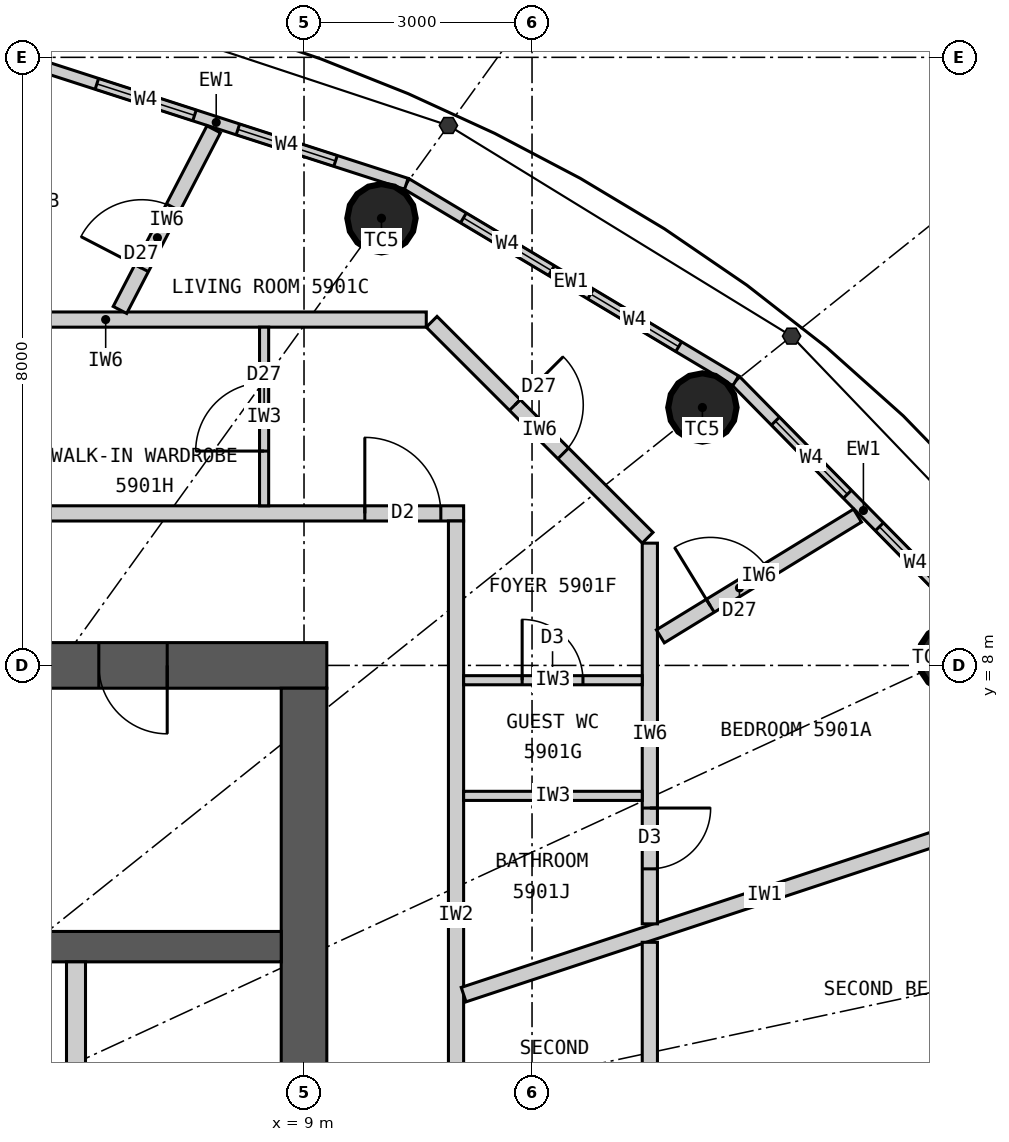
"""IFC4 building model, lengths in metres.
Left out: names, types, materials, properties, quantities, classifications, styles, units other than length and angle.
Written with IfcOpenShell. Run it as: python <this file> out.ifc"""

import sys

from ifc_helpers import new_model, si_unit, direction, frame, frame_2d, origin, origin_2d, place, context, subcontext, project, spatial, rectangle, circle, extrude, element, fill, save


model = new_model("IFC4")
c1 = context("Model", 3, precision=1e-05, world=origin(), true_north=direction((0.0, 1.0)))
c2 = subcontext(c1, "Body", "Model", "MODEL_VIEW")
j1 = project(units=[si_unit("LENGTHUNIT", "METRE"), si_unit("PLANEANGLEUNIT", "RADIAN")], contexts=[c1])
p1 = place(None, origin())
s1 = spatial("IfcSite", under=j1, at=p1, CompositionType="ELEMENT")
p2 = place(p1, origin())
s2 = spatial("IfcBuilding", under=s1, at=p2, CompositionType="ELEMENT")
p3 = place(p2, frame((0.0, 0.0, 219.3)))
s3 = spatial("IfcBuildingStorey", under=s2, at=p3, CompositionType="ELEMENT", Elevation=219.3)
for number, where, z_axis, x_axis in (
    (1, (17.532, 8.098, 0.0), (0.0, 0.0, 1.0), (1.0, 0.0, 0.0)),
    (2, (14.241, 11.393, 0.0), (0.0, 0.0, 1.0), (1.0, 0.0, 0.0)),
    (3, (10.019, 13.883, 0.0), (0.0, 0.0, 1.0), (1.0, 0.0, 0.0)),
):
    element("IfcColumn", number, at=place(p3, frame(where, z_axis=z_axis, x_axis=x_axis)), inside=s3, PredefinedType="COLUMN", context=c2, shape_type="SweptSolid", body=[
        extrude(circle(Radius=0.45, at=origin_2d()), origin(), (0.0, 0.0, 1.0), 3.3),
    ])
p4 = place(p3, frame((-9.3, 8.0, 0.0), z_axis=(0.0, 0.0, 1.0), x_axis=(1.0, 0.0, 0.0)))
e4 = element("IfcWall", 4, at=p4, inside=s3, PredefinedType="SHEAR", context=c2, shape_type="SweptSolid", body=[
    extrude(rectangle(XDim=18.6, YDim=0.6, at=frame_2d((9.3, 0.0))), origin(), (0.0, 0.0, 1.0), 3.3),
])
p5 = place(p4, frame((8.0, 0.0, 0.0)))
e5 = element("IfcOpeningElement", 5, at=p5, cuts=e4, PredefinedType="OPENING", context=c2, shape_type="SweptSolid", body=[
    extrude(rectangle(XDim=1.2, YDim=2.2, at=frame_2d((0.6, 1.1))), frame((0.0, 0.31, 0.0), z_axis=(0.0, -1.0, 0.0), x_axis=(1.0, 0.0, 0.0)), (0.0, 0.0, 1.0), 0.62),
])
p6 = place(p4, frame((15.6, 0.0, 0.0)))
e6 = element("IfcOpeningElement", 6, at=p6, cuts=e4, PredefinedType="OPENING", context=c2, shape_type="SweptSolid", body=[
    extrude(rectangle(XDim=0.9, YDim=2.2, at=frame_2d((0.45, 1.1))), frame((0.0, 0.31, 0.0), z_axis=(0.0, -1.0, 0.0), x_axis=(1.0, 0.0, 0.0)), (0.0, 0.0, 1.0), 0.62),
])
p7 = place(p3, frame((9.0, -7.7, 0.0), z_axis=(0.0, 0.0, 1.0), x_axis=(0.0, 1.0, 0.0)))
e7 = element("IfcWall", 7, at=p7, inside=s3, PredefinedType="SHEAR", context=c2, shape_type="SweptSolid", body=[
    extrude(rectangle(XDim=15.4, YDim=0.6, at=frame_2d((7.7, 0.0))), origin(), (0.0, 0.0, 1.0), 3.3),
])
p8 = place(p7, frame((6.8, 0.0, 0.0)))
e8 = element("IfcOpeningElement", 8, at=p8, cuts=e7, PredefinedType="OPENING", context=c2, shape_type="SweptSolid", body=[
    extrude(rectangle(XDim=1.8, YDim=2.2, at=frame_2d((0.9, 1.1))), frame((0.0, 0.31, 0.0), z_axis=(0.0, -1.0, 0.0), x_axis=(1.0, 0.0, 0.0)), (0.0, 0.0, 1.0), 0.62),
])
p9 = place(p3, frame((-8.7, 4.3, 0.0), z_axis=(0.0, 0.0, 1.0), x_axis=(1.0, 0.0, 0.0)))
e9 = element("IfcWall", 9, at=p9, inside=s3, PredefinedType="SHEAR", context=c2, shape_type="SweptSolid", body=[
    extrude(rectangle(XDim=17.4, YDim=0.4, at=frame_2d((8.7, 0.0))), origin(), (0.0, 0.0, 1.0), 3.3),
])
p10 = place(p3, frame((6.0, 1.75, 0.0), z_axis=(0.0, 0.0, 1.0), x_axis=(0.0, 1.0, 0.0)))
e10 = element("IfcWall", 10, at=p10, inside=s3, PredefinedType="PARTITIONING", context=c2, shape_type="SweptSolid", body=[
    extrude(rectangle(XDim=2.35, YDim=0.25, at=frame_2d((1.175, 0.0))), origin(), (0.0, 0.0, 1.0), 3.3),
])
p11 = place(p3, frame((18.04, 8.332, 0.0), z_axis=(0.0, 0.0, 1.0), x_axis=(-0.701527379618, 0.712642501993, 0.0)))
e11 = element("IfcWall", 11, at=p11, inside=s3, PredefinedType="ELEMENTEDWALL", context=c2, shape_type="SweptSolid", body=[
    extrude(rectangle(XDim=4.788, YDim=0.15, at=frame_2d((2.394, 0.0))), origin(), (0.0, 0.0, 1.0), 3.12),
])
p12 = place(p11, frame((0.744, 0.0, 0.9)))
e12 = element("IfcOpeningElement", 12, at=p12, cuts=e11, PredefinedType="OPENING", context=c2, shape_type="SweptSolid", body=[
    extrude(rectangle(XDim=1.35, YDim=1.9, at=frame_2d((0.675, 0.95))), frame((0.0, 0.085, 0.0), z_axis=(0.0, -1.0, 0.0), x_axis=(1.0, 0.0, 0.0)), (0.0, 0.0, 1.0), 0.17),
])
p13 = place(p11, frame((2.694, 0.0, 0.9)))
e13 = element("IfcOpeningElement", 13, at=p13, cuts=e11, PredefinedType="OPENING", context=c2, shape_type="SweptSolid", body=[
    extrude(rectangle(XDim=1.35, YDim=1.9, at=frame_2d((0.675, 0.95))), frame((0.0, 0.085, 0.0), z_axis=(0.0, -1.0, 0.0), x_axis=(1.0, 0.0, 0.0)), (0.0, 0.0, 1.0), 0.17),
])
p14 = place(p3, frame((14.68, 11.744, 0.0), z_axis=(0.0, 0.0, 1.0), x_axis=(-0.85822150553, 0.513279502265, 0.0)))
e14 = element("IfcWall", 14, at=p14, inside=s3, PredefinedType="ELEMENTEDWALL", context=c2, shape_type="SweptSolid", body=[
    extrude(rectangle(XDim=5.05, YDim=0.15, at=frame_2d((2.525, 0.0))), origin(), (0.0, 0.0, 1.0), 3.12),
])
p15 = place(p14, frame((0.875, 0.0, 0.9)))
e15 = element("IfcOpeningElement", 15, at=p15, cuts=e14, PredefinedType="OPENING", context=c2, shape_type="SweptSolid", body=[
    extrude(rectangle(XDim=1.35, YDim=1.9, at=frame_2d((0.675, 0.95))), frame((0.0, 0.085, 0.0), z_axis=(0.0, -1.0, 0.0), x_axis=(1.0, 0.0, 0.0)), (0.0, 0.0, 1.0), 0.17),
])
p16 = place(p14, frame((2.825, 0.0, 0.9)))
e16 = element("IfcOpeningElement", 16, at=p16, cuts=e14, PredefinedType="OPENING", context=c2, shape_type="SweptSolid", body=[
    extrude(rectangle(XDim=1.35, YDim=1.9, at=frame_2d((0.675, 0.95))), frame((0.0, 0.085, 0.0), z_axis=(0.0, -1.0, 0.0), x_axis=(1.0, 0.0, 0.0)), (0.0, 0.0, 1.0), 0.17),
])
p17 = place(p3, frame((10.346, 14.336, 0.0), z_axis=(0.0, 0.0, 1.0), x_axis=(-0.951644702515, 0.307200846638, 0.0)))
e17 = element("IfcWall", 17, at=p17, inside=s3, PredefinedType="ELEMENTEDWALL", context=c2, shape_type="SweptSolid", body=[
    extrude(rectangle(XDim=5.258, YDim=0.15, at=frame_2d((2.629, 0.0))), origin(), (0.0, 0.0, 1.0), 3.12),
])
p18 = place(p17, frame((0.979, 0.0, 0.9)))
e18 = element("IfcOpeningElement", 18, at=p18, cuts=e17, PredefinedType="OPENING", context=c2, shape_type="SweptSolid", body=[
    extrude(rectangle(XDim=1.35, YDim=1.9, at=frame_2d((0.675, 0.95))), frame((0.0, 0.085, 0.0), z_axis=(0.0, -1.0, 0.0), x_axis=(1.0, 0.0, 0.0)), (0.0, 0.0, 1.0), 0.17),
])
p19 = place(p17, frame((2.929, 0.0, 0.9)))
e19 = element("IfcOpeningElement", 19, at=p19, cuts=e17, PredefinedType="OPENING", context=c2, shape_type="SweptSolid", body=[
    extrude(rectangle(XDim=1.35, YDim=1.9, at=frame_2d((0.675, 0.95))), frame((0.0, 0.085, 0.0), z_axis=(0.0, -1.0, 0.0), x_axis=(1.0, 0.0, 0.0)), (0.0, 0.0, 1.0), 0.17),
])
p20 = place(p3, frame((-11.1, 10.0, 0.0), z_axis=(0.0, 0.0, 1.0), x_axis=(1.0, 0.0, 0.0)))
e20 = element("IfcWall", 20, at=p20, inside=s3, PredefinedType="PARTITIONING", context=c2, shape_type="SweptSolid", body=[
    extrude(rectangle(XDim=22.2, YDim=0.2, at=frame_2d((11.1, 0.0))), origin(), (0.0, 0.0, 1.0), 3.12),
])
p21 = place(p20, frame((20.9, 0.0, 0.0)))
e21 = element("IfcOpeningElement", 21, at=p21, cuts=e20, PredefinedType="OPENING", context=c2, shape_type="SweptSolid", body=[
    extrude(rectangle(XDim=1.0, YDim=2.2, at=frame_2d((0.5, 1.1))), frame((0.0, 0.11, 0.0), z_axis=(0.0, -1.0, 0.0), x_axis=(1.0, 0.0, 0.0)), (0.0, 0.0, 1.0), 0.22),
])
p22 = place(p20, frame((2.82, 0.0, 0.0)))
e22 = element("IfcOpeningElement", 22, at=p22, cuts=e20, PredefinedType="OPENING", context=c2, shape_type="SweptSolid", body=[
    extrude(rectangle(XDim=1.0, YDim=2.2, at=frame_2d((0.5, 1.1))), frame((0.0, 0.11, 0.0), z_axis=(0.0, -1.0, 0.0), x_axis=(1.0, 0.0, 0.0)), (0.0, 0.0, 1.0), 0.22),
])
p23 = place(p3, frame((11.0, -0.464, 0.0), z_axis=(0.0, 0.0, 1.0), x_axis=(0.0, 1.0, 0.0)))
e23 = element("IfcWall", 23, at=p23, inside=s3, PredefinedType="PARTITIONING", context=c2, shape_type="SweptSolid", body=[
    extrude(rectangle(XDim=10.364, YDim=0.2, at=frame_2d((5.182, 0.0))), origin(), (0.0, 0.0, 1.0), 3.12),
])
p24 = place(p3, frame((11.1, 3.669, 0.0), z_axis=(0.0, 0.0, 1.0), x_axis=(0.949476668397, 0.313837627079, 0.0)))
e24 = element("IfcWall", 24, at=p24, inside=s3, PredefinedType="PARTITIONING", context=c2, shape_type="SweptSolid", body=[
    extrude(rectangle(XDim=8.339, YDim=0.2, at=frame_2d((4.169, 0.0))), origin(), (0.0, 0.0, 1.0), 3.12),
])
p25 = place(p3, frame((13.55, 4.6, 0.0), z_axis=(0.0, 0.0, 1.0), x_axis=(0.0, 1.0, 0.0)))
e25 = element("IfcWall", 25, at=p25, inside=s3, PredefinedType="PARTITIONING", context=c2, shape_type="SweptSolid", body=[
    extrude(rectangle(XDim=5.009, YDim=0.2, at=frame_2d((2.504, 0.0))), origin(), (0.0, 0.0, 1.0), 3.12),
])
p26 = place(p25, frame((0.724, 0.0, 0.0)))
e26 = element("IfcOpeningElement", 26, at=p26, cuts=e25, PredefinedType="OPENING", context=c2, shape_type="SweptSolid", body=[
    extrude(rectangle(XDim=0.8, YDim=2.1, at=frame_2d((0.4, 1.05))), frame((0.0, 0.11, 0.0), z_axis=(0.0, -1.0, 0.0), x_axis=(1.0, 0.0, 0.0)), (0.0, 0.0, 1.0), 0.22),
])
p27 = place(p3, frame((13.521, 9.679, 0.0), z_axis=(0.0, 0.0, 1.0), x_axis=(-0.707106781187, 0.707106781187, 0.0)))
e27 = element("IfcWall", 27, at=p27, inside=s3, PredefinedType="PARTITIONING", context=c2, shape_type="SweptSolid", body=[
    extrude(rectangle(XDim=4.019, YDim=0.2, at=frame_2d((2.009, 0.0))), origin(), (0.0, 0.0, 1.0), 3.12),
])
p28 = place(p27, frame((1.57, 0.0, 0.0)))
e28 = element("IfcOpeningElement", 28, at=p28, cuts=e27, PredefinedType="OPENING", context=c2, shape_type="SweptSolid", body=[
    extrude(rectangle(XDim=0.9, YDim=2.1, at=frame_2d((0.45, 1.05))), frame((0.0, 0.11, 0.0), z_axis=(0.0, -1.0, 0.0), x_axis=(1.0, 0.0, 0.0)), (0.0, 0.0, 1.0), 0.22),
])
p29 = place(p3, frame((10.609, 12.55, 0.0), z_axis=(0.0, 0.0, 1.0), x_axis=(-1.0, 0.0, 0.0)))
e29 = element("IfcWall", 29, at=p29, inside=s3, PredefinedType="PARTITIONING", context=c2, shape_type="SweptSolid", body=[
    extrude(rectangle(XDim=8.437, YDim=0.2, at=frame_2d((4.218, 0.0))), origin(), (0.0, 0.0, 1.0), 3.12),
])
p30 = place(p29, frame((5.376, 0.0, 0.0)))
e30 = element("IfcOpeningElement", 30, at=p30, cuts=e29, PredefinedType="OPENING", context=c2, shape_type="SweptSolid", body=[
    extrude(rectangle(XDim=0.8, YDim=2.1, at=frame_2d((0.4, 1.05))), frame((0.0, 0.11, 0.0), z_axis=(0.0, -1.0, 0.0), x_axis=(1.0, 0.0, 0.0)), (0.0, 0.0, 1.0), 0.22),
])
p31 = place(p3, frame((13.688, 8.382, 0.0), z_axis=(0.0, 0.0, 1.0), x_axis=(0.852783459586, 0.522264656144, 0.0)))
e31 = element("IfcWall", 31, at=p31, inside=s3, PredefinedType="PARTITIONING", context=c2, shape_type="SweptSolid", body=[
    extrude(rectangle(XDim=3.042, YDim=0.2, at=frame_2d((1.521, 0.0))), origin(), (0.0, 0.0, 1.0), 3.12),
])
p32 = place(p31, frame((0.77, 0.0, 0.0)))
e32 = element("IfcOpeningElement", 32, at=p32, cuts=e31, PredefinedType="OPENING", context=c2, shape_type="SweptSolid", body=[
    extrude(rectangle(XDim=0.9, YDim=2.1, at=frame_2d((0.45, 1.05))), frame((0.0, 0.11, 0.0), z_axis=(0.0, -1.0, 0.0), x_axis=(1.0, 0.0, 0.0)), (0.0, 0.0, 1.0), 0.22),
])
p33 = place(p3, frame((6.578, 12.677, 0.0), z_axis=(0.0, 0.0, 1.0), x_axis=(0.460620531465, 0.887597164255, 0.0)))
e33 = element("IfcWall", 33, at=p33, inside=s3, PredefinedType="PARTITIONING", context=c2, shape_type="SweptSolid", body=[
    extrude(rectangle(XDim=2.678, YDim=0.2, at=frame_2d((1.339, 0.0))), origin(), (0.0, 0.0, 1.0), 3.12),
])
p34 = place(p33, frame((0.62, 0.0, 0.0)))
e34 = element("IfcOpeningElement", 34, at=p34, cuts=e33, PredefinedType="OPENING", context=c2, shape_type="SweptSolid", body=[
    extrude(rectangle(XDim=0.9, YDim=2.1, at=frame_2d((0.45, 1.05))), frame((0.0, 0.11, 0.0), z_axis=(0.0, -1.0, 0.0), x_axis=(1.0, 0.0, 0.0)), (0.0, 0.0, 1.0), 0.22),
])
p35 = place(p3, frame((11.1, 6.284, 0.0), z_axis=(0.0, 0.0, 1.0), x_axis=(1.0, 0.0, 0.0)))
e35 = element("IfcWall", 35, at=p35, inside=s3, PredefinedType="PARTITIONING", context=c2, shape_type="SweptSolid", body=[
    extrude(rectangle(XDim=2.35, YDim=0.12, at=frame_2d((1.175, 0.0))), origin(), (0.0, 0.0, 1.0), 3.12),
])
p36 = place(p3, frame((11.1, 7.805, 0.0), z_axis=(0.0, 0.0, 1.0), x_axis=(1.0, 0.0, 0.0)))
e36 = element("IfcWall", 36, at=p36, inside=s3, PredefinedType="PARTITIONING", context=c2, shape_type="SweptSolid", body=[
    extrude(rectangle(XDim=2.35, YDim=0.12, at=frame_2d((1.175, 0.0))), origin(), (0.0, 0.0, 1.0), 3.12),
])
p37 = place(p36, frame((0.77, 0.0, 0.0)))
e37 = element("IfcOpeningElement", 37, at=p37, cuts=e36, PredefinedType="OPENING", context=c2, shape_type="SweptSolid", body=[
    extrude(rectangle(XDim=0.8, YDim=2.1, at=frame_2d((0.4, 1.05))), frame((0.0, 0.07, 0.0), z_axis=(0.0, -1.0, 0.0), x_axis=(1.0, 0.0, 0.0)), (0.0, 0.0, 1.0), 0.14),
])
p38 = place(p3, frame((8.475, 10.1, 0.0), z_axis=(0.0, 0.0, 1.0), x_axis=(0.0, 1.0, 0.0)))
e38 = element("IfcWall", 38, at=p38, inside=s3, PredefinedType="PARTITIONING", context=c2, shape_type="SweptSolid", body=[
    extrude(rectangle(XDim=2.35, YDim=0.12, at=frame_2d((1.175, 0.0))), origin(), (0.0, 0.0, 1.0), 3.12),
])
p39 = place(p38, frame((0.72, 0.0, 0.0)))
e39 = element("IfcOpeningElement", 39, at=p39, cuts=e38, PredefinedType="OPENING", context=c2, shape_type="SweptSolid", body=[
    extrude(rectangle(XDim=0.9, YDim=2.1, at=frame_2d((0.45, 1.05))), frame((0.0, 0.07, 0.0), z_axis=(0.0, -1.0, 0.0), x_axis=(1.0, 0.0, 0.0)), (0.0, 0.0, 1.0), 0.14),
])
p40 = place(p3, frame((13.55, -8.139, 0.0), z_axis=(0.0, 0.0, 1.0), x_axis=(0.0, 1.0, 0.0)))
e40 = element("IfcWall", 40, at=p40, inside=s3, PredefinedType="PARTITIONING", context=c2, shape_type="SweptSolid", body=[
    extrude(rectangle(XDim=12.496, YDim=0.2, at=frame_2d((6.248, 0.0))), origin(), (0.0, 0.0, 1.0), 3.12),
])
p41 = place(p40, frame((2.42, 0.0, 0.0)))
e41 = element("IfcOpeningElement", 41, at=p41, cuts=e40, PredefinedType="OPENING", context=c2, shape_type="SweptSolid", body=[
    extrude(rectangle(XDim=0.8, YDim=2.1, at=frame_2d((0.4, 1.05))), frame((0.0, 0.11, 0.0), z_axis=(0.0, -1.0, 0.0), x_axis=(1.0, 0.0, 0.0)), (0.0, 0.0, 1.0), 0.22),
])
p42 = place(p40, frame((9.776, 0.0, 0.0)))
e42 = element("IfcOpeningElement", 42, at=p42, cuts=e40, PredefinedType="OPENING", context=c2, shape_type="SweptSolid", body=[
    extrude(rectangle(XDim=0.8, YDim=2.1, at=frame_2d((0.4, 1.05))), frame((0.0, 0.11, 0.0), z_axis=(0.0, -1.0, 0.0), x_axis=(1.0, 0.0, 0.0)), (0.0, 0.0, 1.0), 0.22),
])
p43 = place(p40, frame((5.82, 0.0, 0.0)))
e43 = element("IfcOpeningElement", 43, at=p43, cuts=e40, PredefinedType="OPENING", context=c2, shape_type="SweptSolid", body=[
    extrude(rectangle(XDim=0.9, YDim=2.1, at=frame_2d((0.45, 1.05))), frame((0.0, 0.11, 0.0), z_axis=(0.0, -1.0, 0.0), x_axis=(1.0, 0.0, 0.0)), (0.0, 0.0, 1.0), 0.22),
])
p44 = place(p12, origin())
e44 = element("IfcWindow", 44, at=p44, inside=s3, PartitioningType="SINGLE_PANEL", PredefinedType="WINDOW", context=c2, shape_type="SweptSolid", body=[
    extrude(rectangle(XDim=1.35, YDim=1.9, at=frame_2d((0.675, 0.95))), frame((0.0, 0.03, 0.0), z_axis=(0.0, -1.0, 0.0), x_axis=(1.0, 0.0, 0.0)), (0.0, 0.0, 1.0), 0.06),
])
fill(e12, e44)
p45 = place(p13, origin())
e45 = element("IfcWindow", 45, at=p45, inside=s3, PartitioningType="SINGLE_PANEL", PredefinedType="WINDOW", context=c2, shape_type="SweptSolid", body=[
    extrude(rectangle(XDim=1.35, YDim=1.9, at=frame_2d((0.675, 0.95))), frame((0.0, 0.03, 0.0), z_axis=(0.0, -1.0, 0.0), x_axis=(1.0, 0.0, 0.0)), (0.0, 0.0, 1.0), 0.06),
])
fill(e13, e45)
p46 = place(p15, origin())
e46 = element("IfcWindow", 46, at=p46, inside=s3, PartitioningType="SINGLE_PANEL", PredefinedType="WINDOW", context=c2, shape_type="SweptSolid", body=[
    extrude(rectangle(XDim=1.35, YDim=1.9, at=frame_2d((0.675, 0.95))), frame((0.0, 0.03, 0.0), z_axis=(0.0, -1.0, 0.0), x_axis=(1.0, 0.0, 0.0)), (0.0, 0.0, 1.0), 0.06),
])
fill(e15, e46)
p47 = place(p16, origin())
e47 = element("IfcWindow", 47, at=p47, inside=s3, PartitioningType="SINGLE_PANEL", PredefinedType="WINDOW", context=c2, shape_type="SweptSolid", body=[
    extrude(rectangle(XDim=1.35, YDim=1.9, at=frame_2d((0.675, 0.95))), frame((0.0, 0.03, 0.0), z_axis=(0.0, -1.0, 0.0), x_axis=(1.0, 0.0, 0.0)), (0.0, 0.0, 1.0), 0.06),
])
fill(e16, e47)
p48 = place(p18, origin())
e48 = element("IfcWindow", 48, at=p48, inside=s3, PartitioningType="SINGLE_PANEL", PredefinedType="WINDOW", context=c2, shape_type="SweptSolid", body=[
    extrude(rectangle(XDim=1.35, YDim=1.9, at=frame_2d((0.675, 0.95))), frame((0.0, 0.03, 0.0), z_axis=(0.0, -1.0, 0.0), x_axis=(1.0, 0.0, 0.0)), (0.0, 0.0, 1.0), 0.06),
])
fill(e18, e48)
p49 = place(p19, origin())
e49 = element("IfcWindow", 49, at=p49, inside=s3, PartitioningType="SINGLE_PANEL", PredefinedType="WINDOW", context=c2, shape_type="SweptSolid", body=[
    extrude(rectangle(XDim=1.35, YDim=1.9, at=frame_2d((0.675, 0.95))), frame((0.0, 0.03, 0.0), z_axis=(0.0, -1.0, 0.0), x_axis=(1.0, 0.0, 0.0)), (0.0, 0.0, 1.0), 0.06),
])
fill(e19, e49)
p50 = place(p21, origin())
e50 = element("IfcDoor", 50, at=p50, inside=s3, OperationType="SINGLE_SWING_LEFT", PredefinedType="DOOR", context=c2, shape_type="SweptSolid", body=[
    extrude(rectangle(XDim=1.0, YDim=2.2, at=frame_2d((0.5, 1.1))), frame((0.0, 0.025, 0.0), z_axis=(0.0, -1.0, 0.0), x_axis=(1.0, 0.0, 0.0)), (0.0, 0.0, 1.0), 0.05),
])
fill(e21, e50)
p51 = place(p26, origin())
e51 = element("IfcDoor", 51, at=p51, inside=s3, OperationType="SINGLE_SWING_RIGHT", PredefinedType="DOOR", context=c2, shape_type="SweptSolid", body=[
    extrude(rectangle(XDim=0.8, YDim=2.1, at=frame_2d((0.4, 1.05))), frame((0.0, 0.025, 0.0), z_axis=(0.0, -1.0, 0.0), x_axis=(1.0, 0.0, 0.0)), (0.0, 0.0, 1.0), 0.05),
])
fill(e26, e51)
p52 = place(p37, origin())
e52 = element("IfcDoor", 52, at=p52, inside=s3, OperationType="SINGLE_SWING_LEFT", PredefinedType="DOOR", context=c2, shape_type="SweptSolid", body=[
    extrude(rectangle(XDim=0.8, YDim=2.1, at=frame_2d((0.4, 1.05))), frame((0.0, 0.025, 0.0), z_axis=(0.0, -1.0, 0.0), x_axis=(1.0, 0.0, 0.0)), (0.0, 0.0, 1.0), 0.05),
])
fill(e37, e52)
p53 = place(p39, origin())
e53 = element("IfcDoor", 53, at=p53, inside=s3, OperationType="SINGLE_SWING_LEFT", PredefinedType="DOOR", context=c2, shape_type="SweptSolid", body=[
    extrude(rectangle(XDim=0.9, YDim=2.1, at=frame_2d((0.45, 1.05))), frame((0.0, 0.025, 0.0), z_axis=(0.0, -1.0, 0.0), x_axis=(1.0, 0.0, 0.0)), (0.0, 0.0, 1.0), 0.05),
])
fill(e39, e53)
p54 = place(p28, origin())
e54 = element("IfcDoor", 54, at=p54, inside=s3, OperationType="SINGLE_SWING_RIGHT", PredefinedType="DOOR", context=c2, shape_type="SweptSolid", body=[
    extrude(rectangle(XDim=0.9, YDim=2.1, at=frame_2d((0.45, 1.05))), frame((0.0, 0.025, 0.0), z_axis=(0.0, -1.0, 0.0), x_axis=(1.0, 0.0, 0.0)), (0.0, 0.0, 1.0), 0.05),
])
fill(e28, e54)
p55 = place(p32, origin())
e55 = element("IfcDoor", 55, at=p55, inside=s3, OperationType="SINGLE_SWING_LEFT", PredefinedType="DOOR", context=c2, shape_type="SweptSolid", body=[
    extrude(rectangle(XDim=0.9, YDim=2.1, at=frame_2d((0.45, 1.05))), frame((0.0, 0.025, 0.0), z_axis=(0.0, -1.0, 0.0), x_axis=(1.0, 0.0, 0.0)), (0.0, 0.0, 1.0), 0.05),
])
fill(e32, e55)
p56 = place(p34, origin())
e56 = element("IfcDoor", 56, at=p56, inside=s3, OperationType="SINGLE_SWING_LEFT", PredefinedType="DOOR", context=c2, shape_type="SweptSolid", body=[
    extrude(rectangle(XDim=0.9, YDim=2.1, at=frame_2d((0.45, 1.05))), frame((0.0, 0.025, 0.0), z_axis=(0.0, -1.0, 0.0), x_axis=(1.0, 0.0, 0.0)), (0.0, 0.0, 1.0), 0.05),
])
fill(e34, e56)
p57 = place(p6, origin())
e57 = element("IfcDoor", 57, at=p57, inside=s3, OperationType="SINGLE_SWING_RIGHT", PredefinedType="DOOR", context=c2, shape_type="SweptSolid", body=[
    extrude(rectangle(XDim=0.9, YDim=2.2, at=frame_2d((0.45, 1.1))), frame((0.0, 0.025, 0.0), z_axis=(0.0, -1.0, 0.0), x_axis=(1.0, 0.0, 0.0)), (0.0, 0.0, 1.0), 0.05),
])
fill(e6, e57)
save(model, sys.argv[1])
